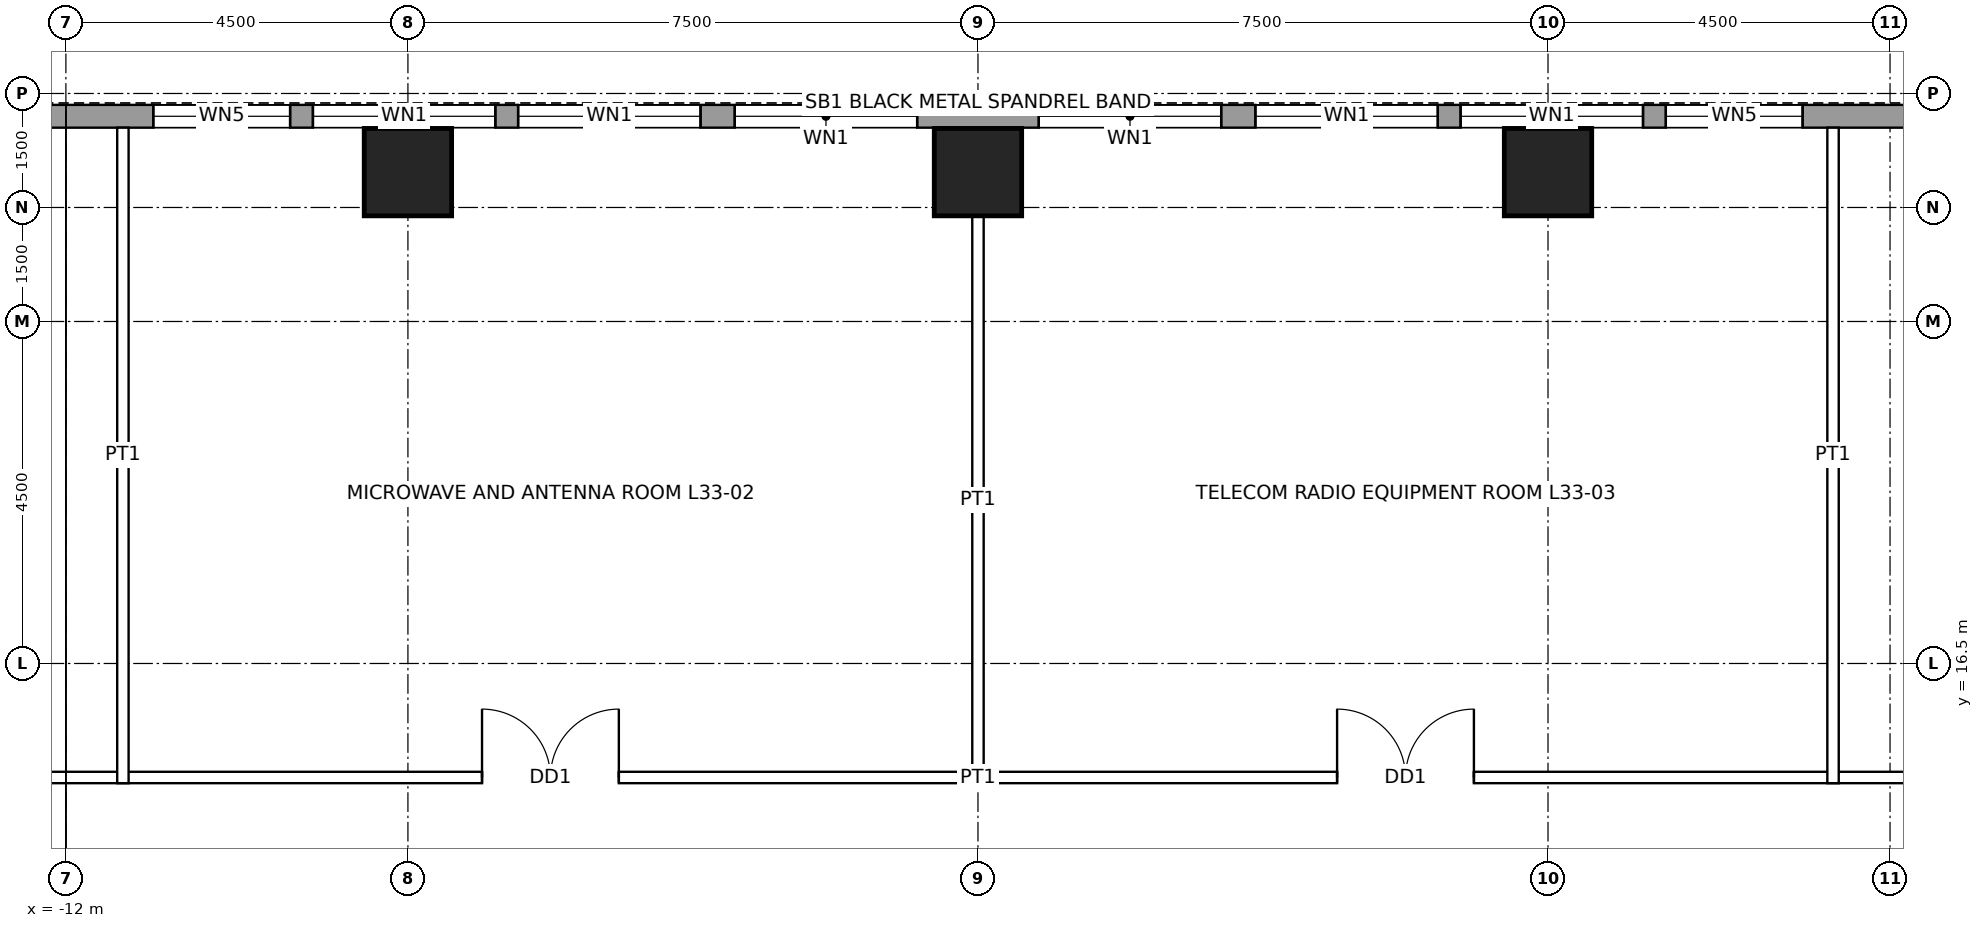
"""IFC4 building model, lengths in metres.
Left out: names, types, materials, properties, quantities, classifications, styles, units other than length and angle.
Written with IfcOpenShell. Run it as: python <this file> out.ifc"""

import sys

from ifc_helpers import new_model, si_unit, direction, frame, frame_2d, origin, origin_2d, place, context, subcontext, project, spatial, rectangle, hollow_rectangle, extrude, element, fill, save


model = new_model("IFC4")
c1 = context("Model", 3, precision=1e-05, world=origin(), true_north=direction((0.0, 1.0)))
c2 = subcontext(c1, "Body", "Model", "MODEL_VIEW")
j1 = project(units=[si_unit("LENGTHUNIT", "METRE"), si_unit("PLANEANGLEUNIT", "RADIAN")], contexts=[c1])
p1 = place(None, origin())
s1 = spatial("IfcSite", under=j1, at=p1, CompositionType="ELEMENT")
p2 = place(p1, origin())
s2 = spatial("IfcBuilding", under=s1, at=p2, CompositionType="ELEMENT")
p3 = place(p2, frame((0.0, 0.0, 162.9)))
s3 = spatial("IfcBuildingStorey", under=s2, at=p3, CompositionType="ELEMENT", Elevation=162.9)
for number, where, z_axis, x_axis in (
    (1, (-7.5, 22.965, 0.0), (0.0, 0.0, 1.0), (1.0, 0.0, 0.0)),
    (2, (0.0, 22.965, 0.0), (0.0, 0.0, 1.0), (1.0, 0.0, 0.0)),
    (3, (7.5, 22.965, 0.0), (0.0, 0.0, 1.0), (1.0, 0.0, 0.0)),
):
    element("IfcColumn", number, at=place(p3, frame(where, z_axis=z_axis, x_axis=x_axis)), inside=s3, PredefinedType="COLUMN", context=c2, shape_type="SweptSolid", body=[
        extrude(hollow_rectangle(XDim=1.15, YDim=1.15, WallThickness=0.075, at=origin_2d()), origin(), (0.0, 0.0, 1.0), 4.5),
    ])
p4 = place(p3, frame((-16.2, 23.7, 0.0), z_axis=(0.0, 0.0, 1.0), x_axis=(1.0, 0.0, 0.0)))
e4 = element("IfcWall", 4, at=p4, inside=s3, PredefinedType="SOLIDWALL", context=c2, shape_type="SweptSolid", body=[
    extrude(rectangle(XDim=32.4, YDim=0.3, at=frame_2d((16.2, 0.0))), origin(), (0.0, 0.0, 1.0), 4.3),
])
p5 = place(p4, frame((5.35, 0.0, 1.0)))
e5 = element("IfcOpeningElement", 5, at=p5, cuts=e4, PredefinedType="OPENING", context=c2, shape_type="SweptSolid", body=[
    extrude(rectangle(XDim=1.8, YDim=1.2, at=frame_2d((0.9, 0.6))), frame((0.0, 0.16, 0.0), z_axis=(0.0, -1.0, 0.0), x_axis=(1.0, 0.0, 0.0)), (0.0, 0.0, 1.0), 0.32),
])
p6 = place(p4, frame((7.45, 0.0, 1.0)))
e6 = element("IfcOpeningElement", 6, at=p6, cuts=e4, PredefinedType="OPENING", context=c2, shape_type="SweptSolid", body=[
    extrude(rectangle(XDim=2.4, YDim=1.2, at=frame_2d((1.2, 0.6))), frame((0.0, 0.16, 0.0), z_axis=(0.0, -1.0, 0.0), x_axis=(1.0, 0.0, 0.0)), (0.0, 0.0, 1.0), 0.32),
])
p7 = place(p4, frame((10.15, 0.0, 1.0)))
e7 = element("IfcOpeningElement", 7, at=p7, cuts=e4, PredefinedType="OPENING", context=c2, shape_type="SweptSolid", body=[
    extrude(rectangle(XDim=2.4, YDim=1.2, at=frame_2d((1.2, 0.6))), frame((0.0, 0.16, 0.0), z_axis=(0.0, -1.0, 0.0), x_axis=(1.0, 0.0, 0.0)), (0.0, 0.0, 1.0), 0.32),
])
p8 = place(p4, frame((13.0, 0.0, 1.0)))
e8 = element("IfcOpeningElement", 8, at=p8, cuts=e4, PredefinedType="OPENING", context=c2, shape_type="SweptSolid", body=[
    extrude(rectangle(XDim=2.4, YDim=1.2, at=frame_2d((1.2, 0.6))), frame((0.0, 0.16, 0.0), z_axis=(0.0, -1.0, 0.0), x_axis=(1.0, 0.0, 0.0)), (0.0, 0.0, 1.0), 0.32),
])
p9 = place(p4, frame((17.0, 0.0, 1.0)))
e9 = element("IfcOpeningElement", 9, at=p9, cuts=e4, PredefinedType="OPENING", context=c2, shape_type="SweptSolid", body=[
    extrude(rectangle(XDim=2.4, YDim=1.2, at=frame_2d((1.2, 0.6))), frame((0.0, 0.16, 0.0), z_axis=(0.0, -1.0, 0.0), x_axis=(1.0, 0.0, 0.0)), (0.0, 0.0, 1.0), 0.32),
])
p10 = place(p4, frame((19.85, 0.0, 1.0)))
e10 = element("IfcOpeningElement", 10, at=p10, cuts=e4, PredefinedType="OPENING", context=c2, shape_type="SweptSolid", body=[
    extrude(rectangle(XDim=2.4, YDim=1.2, at=frame_2d((1.2, 0.6))), frame((0.0, 0.16, 0.0), z_axis=(0.0, -1.0, 0.0), x_axis=(1.0, 0.0, 0.0)), (0.0, 0.0, 1.0), 0.32),
])
p11 = place(p4, frame((22.55, 0.0, 1.0)))
e11 = element("IfcOpeningElement", 11, at=p11, cuts=e4, PredefinedType="OPENING", context=c2, shape_type="SweptSolid", body=[
    extrude(rectangle(XDim=2.4, YDim=1.2, at=frame_2d((1.2, 0.6))), frame((0.0, 0.16, 0.0), z_axis=(0.0, -1.0, 0.0), x_axis=(1.0, 0.0, 0.0)), (0.0, 0.0, 1.0), 0.32),
])
p12 = place(p4, frame((25.25, 0.0, 1.0)))
e12 = element("IfcOpeningElement", 12, at=p12, cuts=e4, PredefinedType="OPENING", context=c2, shape_type="SweptSolid", body=[
    extrude(rectangle(XDim=1.8, YDim=1.2, at=frame_2d((0.9, 0.6))), frame((0.0, 0.16, 0.0), z_axis=(0.0, -1.0, 0.0), x_axis=(1.0, 0.0, 0.0)), (0.0, 0.0, 1.0), 0.32),
])
p13 = place(p3, frame((-15.075, 15.0, 0.0), z_axis=(0.0, 0.0, 1.0), x_axis=(1.0, 0.0, 0.0)))
e13 = element("IfcWall", 13, at=p13, inside=s3, PredefinedType="PARTITIONING", context=c2, shape_type="SweptSolid", body=[
    extrude(rectangle(XDim=30.15, YDim=0.15, at=frame_2d((15.075, 0.0))), origin(), (0.0, 0.0, 1.0), 4.3),
])
p14 = place(p13, frame((8.55, 0.0, 0.0)))
e14 = element("IfcOpeningElement", 14, at=p14, cuts=e13, PredefinedType="OPENING", context=c2, shape_type="SweptSolid", body=[
    extrude(rectangle(XDim=1.8, YDim=2.4, at=frame_2d((0.9, 1.2))), frame((0.0, 0.085, 0.0), z_axis=(0.0, -1.0, 0.0), x_axis=(1.0, 0.0, 0.0)), (0.0, 0.0, 1.0), 0.17),
])
p15 = place(p13, frame((19.8, 0.0, 0.0)))
e15 = element("IfcOpeningElement", 15, at=p15, cuts=e13, PredefinedType="OPENING", context=c2, shape_type="SweptSolid", body=[
    extrude(rectangle(XDim=1.8, YDim=2.4, at=frame_2d((0.9, 1.2))), frame((0.0, 0.085, 0.0), z_axis=(0.0, -1.0, 0.0), x_axis=(1.0, 0.0, 0.0)), (0.0, 0.0, 1.0), 0.17),
])
p16 = place(p13, frame((27.7, 0.0, 0.0)))
e16 = element("IfcOpeningElement", 16, at=p16, cuts=e13, PredefinedType="OPENING", context=c2, shape_type="SweptSolid", body=[
    extrude(rectangle(XDim=1.0, YDim=2.1, at=frame_2d((0.5, 1.05))), frame((0.0, 0.085, 0.0), z_axis=(0.0, -1.0, 0.0), x_axis=(1.0, 0.0, 0.0)), (0.0, 0.0, 1.0), 0.17),
])
p17 = place(p13, frame((1.45, 0.0, 0.0)))
e17 = element("IfcOpeningElement", 17, at=p17, cuts=e13, PredefinedType="OPENING", context=c2, shape_type="SweptSolid", body=[
    extrude(rectangle(XDim=1.0, YDim=2.1, at=frame_2d((0.5, 1.05))), frame((0.0, 0.085, 0.0), z_axis=(0.0, -1.0, 0.0), x_axis=(1.0, 0.0, 0.0)), (0.0, 0.0, 1.0), 0.17),
])
p18 = place(p3, frame((-11.25, 14.925, 0.0), z_axis=(0.0, 0.0, 1.0), x_axis=(0.0, 1.0, 0.0)))
e18 = element("IfcWall", 18, at=p18, inside=s3, PredefinedType="PARTITIONING", context=c2, shape_type="SweptSolid", body=[
    extrude(rectangle(XDim=8.625, YDim=0.15, at=frame_2d((4.312, 0.0))), origin(), (0.0, 0.0, 1.0), 3.431),
])
p19 = place(p3, frame((0.0, 14.925, 0.0), z_axis=(0.0, 0.0, 1.0), x_axis=(0.0, 1.0, 0.0)))
e19 = element("IfcWall", 19, at=p19, inside=s3, PredefinedType="PARTITIONING", context=c2, shape_type="SweptSolid", body=[
    extrude(rectangle(XDim=7.465, YDim=0.15, at=frame_2d((3.732, 0.0))), origin(), (0.0, 0.0, 1.0), 3.431),
])
p20 = place(p3, frame((11.25, 14.925, 0.0), z_axis=(0.0, 0.0, 1.0), x_axis=(0.0, 1.0, 0.0)))
e20 = element("IfcWall", 20, at=p20, inside=s3, PredefinedType="PARTITIONING", context=c2, shape_type="SweptSolid", body=[
    extrude(rectangle(XDim=8.625, YDim=0.15, at=frame_2d((4.312, 0.0))), origin(), (0.0, 0.0, 1.0), 3.431),
])
p21 = place(p5, origin())
e21 = element("IfcWindow", 21, at=p21, inside=s3, PartitioningType="SINGLE_PANEL", PredefinedType="WINDOW", context=c2, shape_type="SweptSolid", body=[
    extrude(rectangle(XDim=1.8, YDim=1.2, at=frame_2d((0.9, 0.6))), frame((0.0, 0.03, 0.0), z_axis=(0.0, -1.0, 0.0), x_axis=(1.0, 0.0, 0.0)), (0.0, 0.0, 1.0), 0.06),
])
fill(e5, e21)
p22 = place(p6, origin())
e22 = element("IfcWindow", 22, at=p22, inside=s3, PartitioningType="SINGLE_PANEL", PredefinedType="WINDOW", context=c2, shape_type="SweptSolid", body=[
    extrude(rectangle(XDim=2.4, YDim=1.2, at=frame_2d((1.2, 0.6))), frame((0.0, 0.03, 0.0), z_axis=(0.0, -1.0, 0.0), x_axis=(1.0, 0.0, 0.0)), (0.0, 0.0, 1.0), 0.06),
])
fill(e6, e22)
p23 = place(p7, origin())
e23 = element("IfcWindow", 23, at=p23, inside=s3, PartitioningType="SINGLE_PANEL", PredefinedType="WINDOW", context=c2, shape_type="SweptSolid", body=[
    extrude(rectangle(XDim=2.4, YDim=1.2, at=frame_2d((1.2, 0.6))), frame((0.0, 0.03, 0.0), z_axis=(0.0, -1.0, 0.0), x_axis=(1.0, 0.0, 0.0)), (0.0, 0.0, 1.0), 0.06),
])
fill(e7, e23)
p24 = place(p8, origin())
e24 = element("IfcWindow", 24, at=p24, inside=s3, PartitioningType="SINGLE_PANEL", PredefinedType="WINDOW", context=c2, shape_type="SweptSolid", body=[
    extrude(rectangle(XDim=2.4, YDim=1.2, at=frame_2d((1.2, 0.6))), frame((0.0, 0.03, 0.0), z_axis=(0.0, -1.0, 0.0), x_axis=(1.0, 0.0, 0.0)), (0.0, 0.0, 1.0), 0.06),
])
fill(e8, e24)
p25 = place(p9, origin())
e25 = element("IfcWindow", 25, at=p25, inside=s3, PartitioningType="SINGLE_PANEL", PredefinedType="WINDOW", context=c2, shape_type="SweptSolid", body=[
    extrude(rectangle(XDim=2.4, YDim=1.2, at=frame_2d((1.2, 0.6))), frame((0.0, 0.03, 0.0), z_axis=(0.0, -1.0, 0.0), x_axis=(1.0, 0.0, 0.0)), (0.0, 0.0, 1.0), 0.06),
])
fill(e9, e25)
p26 = place(p10, origin())
e26 = element("IfcWindow", 26, at=p26, inside=s3, PartitioningType="SINGLE_PANEL", PredefinedType="WINDOW", context=c2, shape_type="SweptSolid", body=[
    extrude(rectangle(XDim=2.4, YDim=1.2, at=frame_2d((1.2, 0.6))), frame((0.0, 0.03, 0.0), z_axis=(0.0, -1.0, 0.0), x_axis=(1.0, 0.0, 0.0)), (0.0, 0.0, 1.0), 0.06),
])
fill(e10, e26)
p27 = place(p11, origin())
e27 = element("IfcWindow", 27, at=p27, inside=s3, PartitioningType="SINGLE_PANEL", PredefinedType="WINDOW", context=c2, shape_type="SweptSolid", body=[
    extrude(rectangle(XDim=2.4, YDim=1.2, at=frame_2d((1.2, 0.6))), frame((0.0, 0.03, 0.0), z_axis=(0.0, -1.0, 0.0), x_axis=(1.0, 0.0, 0.0)), (0.0, 0.0, 1.0), 0.06),
])
fill(e11, e27)
p28 = place(p12, origin())
e28 = element("IfcWindow", 28, at=p28, inside=s3, PartitioningType="SINGLE_PANEL", PredefinedType="WINDOW", context=c2, shape_type="SweptSolid", body=[
    extrude(rectangle(XDim=1.8, YDim=1.2, at=frame_2d((0.9, 0.6))), frame((0.0, 0.03, 0.0), z_axis=(0.0, -1.0, 0.0), x_axis=(1.0, 0.0, 0.0)), (0.0, 0.0, 1.0), 0.06),
])
fill(e12, e28)
p29 = place(p14, origin())
e29 = element("IfcDoor", 29, at=p29, inside=s3, OperationType="DOUBLE_DOOR_SINGLE_SWING", PredefinedType="DOOR", context=c2, shape_type="SweptSolid", body=[
    extrude(rectangle(XDim=1.8, YDim=2.4, at=frame_2d((0.9, 1.2))), frame((0.0, 0.025, 0.0), z_axis=(0.0, -1.0, 0.0), x_axis=(1.0, 0.0, 0.0)), (0.0, 0.0, 1.0), 0.05),
])
fill(e14, e29)
p30 = place(p15, origin())
e30 = element("IfcDoor", 30, at=p30, inside=s3, OperationType="DOUBLE_DOOR_SINGLE_SWING", PredefinedType="DOOR", context=c2, shape_type="SweptSolid", body=[
    extrude(rectangle(XDim=1.8, YDim=2.4, at=frame_2d((0.9, 1.2))), frame((0.0, 0.025, 0.0), z_axis=(0.0, -1.0, 0.0), x_axis=(1.0, 0.0, 0.0)), (0.0, 0.0, 1.0), 0.05),
])
fill(e15, e30)
save(model, sys.argv[1])
